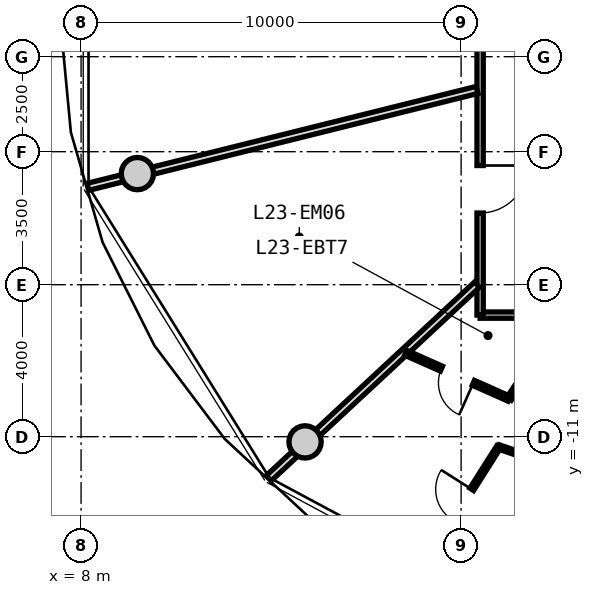
"""IFC4 building model, lengths in metres.
Left out: names, types, materials, properties, quantities, classifications, styles, units other than length and angle.
Written with IfcOpenShell. Run it as: python <this file> out.ifc"""

import sys

from ifc_helpers import new_model, si_unit, direction, frame, frame_2d, origin, origin_2d, place, context, subcontext, project, spatial, rectangle, circle, extrude, source, transform, mapped, element, fill, save


model = new_model("IFC4")
c1 = context("Model", 3, precision=1e-05, world=origin(), true_north=direction((0.0, 1.0)))
c2 = subcontext(c1, "Body", "Model", "MODEL_VIEW")
j1 = project(units=[si_unit("LENGTHUNIT", "METRE"), si_unit("PLANEANGLEUNIT", "RADIAN")], contexts=[c1])
p1 = place(None, origin())
s1 = spatial("IfcSite", under=j1, at=p1, CompositionType="ELEMENT")
p2 = place(p1, origin())
s2 = spatial("IfcBuilding", under=s1, at=p2, CompositionType="ELEMENT")
p3 = place(p2, frame((0.0, 0.0, 77.95)))
s3 = spatial("IfcBuildingStorey", under=s2, at=p3, CompositionType="ELEMENT", Elevation=77.95)
m1 = source(origin(), c2, "Body", "SweptSolid", [
    extrude(circle(Radius=0.425, at=origin_2d()), origin(), (0.0, 0.0, 1.0), 3.47),
])
for number, where, z_axis, x_axis in (
    (1, (9.481, -4.076, -0.42), (0.0, 0.0, 1.0), (1.0, 0.0, 0.0)),
    (2, (13.894, -11.137, -0.42), (0.0, 0.0, 1.0), (1.0, 0.0, 0.0)),
):
    element("IfcColumn", number, at=place(p3, frame(where, z_axis=z_axis, x_axis=x_axis)), inside=s3, PredefinedType="COLUMN", context=c2, shape_type="MappedRepresentation", body=[
        mapped(m1, transform((0.0, 0.0, 0.0), x_axis=(1.0, 0.0, 0.0), y_axis=(0.0, 1.0, 0.0), z_axis=(0.0, 0.0, 1.0), scale=1.0)),
    ])
m2 = source(origin(), c2, "Body", "SweptSolid", [
    extrude(rectangle(XDim=19.0, YDim=0.165, at=frame_2d((9.5, 0.0))), origin(), (0.0, 0.0, 1.0), 2.775),
])
p4 = place(p3, frame((37.5, -7.8, 0.0), z_axis=(0.0, 0.0, 1.0), x_axis=(-1.0, 0.0, 0.0)))
e3 = element("IfcWall", 3, at=p4, inside=s3, PredefinedType="PARTITIONING", context=c2, shape_type="MappedRepresentation", body=[
    mapped(m2, transform((0.0, 0.0, 0.0), x_axis=(1.0, 0.0, 0.0), y_axis=(0.0, 1.0, 0.0), z_axis=(0.0, 0.0, 1.0), scale=1.0)),
])
p5 = place(p4, frame((9.388, 0.0, 0.0)))
e4 = element("IfcOpeningElement", 4, at=p5, cuts=e3, PredefinedType="OPENING", context=c2, shape_type="SweptSolid", body=[
    extrude(rectangle(XDim=1.05, YDim=2.15, at=frame_2d((0.525, 1.075))), frame((0.0, 0.093, 0.0), z_axis=(0.0, -1.0, 0.0), x_axis=(1.0, 0.0, 0.0)), (0.0, 0.0, 1.0), 0.185),
])
m3 = source(origin(), c2, "Body", "SweptSolid", [
    extrude(rectangle(XDim=15.6, YDim=0.165, at=frame_2d((7.8, 0.0))), origin(), (0.0, 0.0, 1.0), 2.775),
])
p6 = place(p3, frame((18.5, -7.8, 0.0), z_axis=(0.0, 0.0, 1.0), x_axis=(0.0, 1.0, 0.0)))
e5 = element("IfcWall", 5, at=p6, inside=s3, PredefinedType="PARTITIONING", context=c2, shape_type="MappedRepresentation", body=[
    mapped(m3, transform((0.0, 0.0, 0.0), x_axis=(1.0, 0.0, 0.0), y_axis=(0.0, 1.0, 0.0), z_axis=(0.0, 0.0, 1.0), scale=1.0)),
])
p7 = place(p6, frame((13.304, 0.0, 0.0)))
e6 = element("IfcOpeningElement", 6, at=p7, cuts=e5, PredefinedType="OPENING", context=c2, shape_type="SweptSolid", body=[
    extrude(rectangle(XDim=0.92, YDim=2.1, at=frame_2d((0.46, 1.05))), frame((0.0, 0.093, 0.0), z_axis=(0.0, -1.0, 0.0), x_axis=(1.0, 0.0, 0.0)), (0.0, 0.0, 1.0), 0.185),
])
p8 = place(p6, frame((10.69, 0.0, 0.0)))
e7 = element("IfcOpeningElement", 7, at=p8, cuts=e5, PredefinedType="OPENING", context=c2, shape_type="SweptSolid", body=[
    extrude(rectangle(XDim=0.92, YDim=2.1, at=frame_2d((0.46, 1.05))), frame((0.0, 0.093, 0.0), z_axis=(0.0, -1.0, 0.0), x_axis=(1.0, 0.0, 0.0)), (0.0, 0.0, 1.0), 0.185),
])
p9 = place(p6, frame((7.175, 0.0, 0.0)))
e8 = element("IfcOpeningElement", 8, at=p9, cuts=e5, PredefinedType="OPENING", context=c2, shape_type="SweptSolid", body=[
    extrude(rectangle(XDim=1.25, YDim=2.2, at=frame_2d((0.625, 1.1))), frame((0.0, 0.093, 0.0), z_axis=(0.0, -1.0, 0.0), x_axis=(1.0, 0.0, 0.0)), (0.0, 0.0, 1.0), 0.185),
])
p10 = place(p6, frame((2.686, 0.0, 0.0)))
e9 = element("IfcOpeningElement", 9, at=p10, cuts=e5, PredefinedType="OPENING", context=c2, shape_type="SweptSolid", body=[
    extrude(rectangle(XDim=1.25, YDim=2.2, at=frame_2d((0.625, 1.1))), frame((0.0, 0.093, 0.0), z_axis=(0.0, -1.0, 0.0), x_axis=(1.0, 0.0, 0.0)), (0.0, 0.0, 1.0), 0.185),
])
m4 = source(origin(), c2, "Body", "SweptSolid", [
    extrude(rectangle(XDim=7.482, YDim=0.19, at=frame_2d((3.741, 0.0))), origin(), (0.0, 0.0, 1.0), 2.275),
])
p11 = place(p3, frame((18.42, -6.998, 0.0), z_axis=(0.0, 0.0, 1.0), x_axis=(-0.732508698043, -0.680757671489, 0.0)))
e10 = element("IfcWall", 10, at=p11, inside=s3, PredefinedType="PARTITIONING", context=c2, shape_type="MappedRepresentation", body=[
    mapped(m4, transform((0.0, 0.0, 0.0), x_axis=(1.0, 0.0, 0.0), y_axis=(0.0, 1.0, 0.0), z_axis=(0.0, 0.0, 1.0), scale=1.0)),
])
m5 = source(origin(), c2, "Body", "SweptSolid", [
    extrude(rectangle(XDim=2.61, YDim=0.14, at=frame_2d((1.305, 0.0))), origin(), (0.0, 0.0, 1.0), 2.775),
])
p12 = place(p3, frame((20.714, -7.83, 0.0), z_axis=(0.0, 0.0, 1.0), x_axis=(-0.55584360516, -0.83128688586, 0.0)))
e11 = element("IfcWall", 11, at=p12, inside=s3, PredefinedType="PARTITIONING", context=c2, shape_type="MappedRepresentation", body=[
    mapped(m5, transform((0.0, 0.0, 0.0), x_axis=(1.0, 0.0, 0.0), y_axis=(0.0, 1.0, 0.0), z_axis=(0.0, 0.0, 1.0), scale=1.0)),
])
m6 = source(origin(), c2, "Body", "SweptSolid", [
    extrude(rectangle(XDim=2.978, YDim=0.14, at=frame_2d((1.489, 0.0))), origin(), (0.0, 0.0, 1.0), 2.775),
])
p13 = place(p3, frame((19.263, -10.0, 0.0), z_axis=(0.0, 0.0, 1.0), x_axis=(-0.913970391966, 0.405780880043, 0.0)))
e12 = element("IfcWall", 12, at=p13, inside=s3, PredefinedType="PARTITIONING", context=c2, shape_type="MappedRepresentation", body=[
    mapped(m6, transform((0.0, 0.0, 0.0), x_axis=(1.0, 0.0, 0.0), y_axis=(0.0, 1.0, 0.0), z_axis=(0.0, 0.0, 1.0), scale=1.0)),
])
p14 = place(p13, frame((1.029, 0.0, 0.0)))
e13 = element("IfcOpeningElement", 13, at=p14, cuts=e12, PredefinedType="OPENING", context=c2, shape_type="SweptSolid", body=[
    extrude(rectangle(XDim=0.92, YDim=2.1, at=frame_2d((0.46, 1.05))), frame((0.0, 0.08, 0.0), z_axis=(0.0, -1.0, 0.0), x_axis=(1.0, 0.0, 0.0)), (0.0, 0.0, 1.0), 0.16),
])
m7 = source(origin(), c2, "Body", "SweptSolid", [
    extrude(rectangle(XDim=3.595, YDim=0.115, at=frame_2d((1.797, 0.0))), origin(), (0.0, 0.0, 1.0), 2.775),
])
p15 = place(p3, frame((18.988, -11.268, 0.0), z_axis=(0.0, 0.0, 1.0), x_axis=(-0.535384889205, -0.844608205271, 0.0)))
e14 = element("IfcWall", 14, at=p15, inside=s3, PredefinedType="PARTITIONING", context=c2, shape_type="MappedRepresentation", body=[
    mapped(m7, transform((0.0, 0.0, 0.0), x_axis=(1.0, 0.0, 0.0), y_axis=(0.0, 1.0, 0.0), z_axis=(0.0, 0.0, 1.0), scale=1.0)),
])
p16 = place(p15, frame((1.323, 0.0, 0.0)))
e15 = element("IfcOpeningElement", 15, at=p16, cuts=e14, PredefinedType="OPENING", context=c2, shape_type="SweptSolid", body=[
    extrude(rectangle(XDim=0.95, YDim=2.1, at=frame_2d((0.475, 1.05))), frame((0.0, 0.067, 0.0), z_axis=(0.0, -1.0, 0.0), x_axis=(1.0, 0.0, 0.0)), (0.0, 0.0, 1.0), 0.135),
])
m8 = source(origin(), c2, "Body", "SweptSolid", [
    extrude(rectangle(XDim=3.591, YDim=0.115, at=frame_2d((1.795, 0.0))), origin(), (0.0, 0.0, 1.0), 2.775),
])
p17 = place(p3, frame((18.988, -11.268, 0.0), z_axis=(0.0, 0.0, 1.0), x_axis=(0.946165628752, -0.323682874074, 0.0)))
e16 = element("IfcWall", 16, at=p17, inside=s3, PredefinedType="PARTITIONING", context=c2, shape_type="MappedRepresentation", body=[
    mapped(m8, transform((0.0, 0.0, 0.0), x_axis=(1.0, 0.0, 0.0), y_axis=(0.0, 1.0, 0.0), z_axis=(0.0, 0.0, 1.0), scale=1.0)),
])
m9 = source(origin(), c2, "Body", "SweptSolid", [
    extrude(rectangle(XDim=10.556, YDim=0.19, at=frame_2d((5.278, 0.0))), origin(), (0.0, 0.0, 1.0), 2.275),
])
p18 = place(p3, frame((18.42, -1.875, 0.0), z_axis=(0.0, 0.0, 1.0), x_axis=(-0.970363857851, -0.241648470667, 0.0)))
e17 = element("IfcWall", 17, at=p18, inside=s3, PredefinedType="PARTITIONING", context=c2, shape_type="MappedRepresentation", body=[
    mapped(m9, transform((0.0, 0.0, 0.0), x_axis=(1.0, 0.0, 0.0), y_axis=(0.0, 1.0, 0.0), z_axis=(0.0, 0.0, 1.0), scale=1.0)),
])
m10 = source(origin(), c2, "Body", "SweptSolid", [
    extrude(rectangle(XDim=0.92, YDim=2.1, at=frame_2d((0.46, 1.05))), frame((0.0, 0.025, 0.0), z_axis=(0.0, -1.0, 0.0), x_axis=(1.0, 0.0, 0.0)), (0.0, 0.0, 1.0), 0.05),
])
p19 = place(p14, origin())
e18 = element("IfcDoor", 18, at=p19, inside=s3, OperationType="SINGLE_SWING_LEFT", PredefinedType="DOOR", context=c2, shape_type="MappedRepresentation", body=[
    mapped(m10, transform((0.0, 0.0, 0.0), x_axis=(1.0, 0.0, 0.0), y_axis=(0.0, 1.0, 0.0), z_axis=(0.0, 0.0, 1.0), scale=1.0)),
])
fill(e13, e18)
m11 = source(origin(), c2, "Body", "SweptSolid", [
    extrude(rectangle(XDim=0.95, YDim=2.1, at=frame_2d((0.475, 1.05))), frame((0.0, 0.025, 0.0), z_axis=(0.0, -1.0, 0.0), x_axis=(1.0, 0.0, 0.0)), (0.0, 0.0, 1.0), 0.05),
])
p20 = place(p16, frame((0.95, 0.0, 0.0), z_axis=(0.0, 0.0, 1.0), x_axis=(-1.0, 0.0, 0.0)))
e19 = element("IfcDoor", 19, at=p20, inside=s3, OperationType="SINGLE_SWING_RIGHT", PredefinedType="DOOR", context=c2, shape_type="MappedRepresentation", body=[
    mapped(m11, transform((0.0, 0.0, 0.0), x_axis=(1.0, 0.0, 0.0), y_axis=(0.0, 1.0, 0.0), z_axis=(0.0, 0.0, 1.0), scale=1.0)),
])
fill(e15, e19)
m12 = source(origin(), c2, "Body", "SweptSolid", [
    extrude(rectangle(XDim=1.25, YDim=2.2, at=frame_2d((0.625, 1.1))), frame((0.0, 0.025, 0.0), z_axis=(0.0, -1.0, 0.0), x_axis=(1.0, 0.0, 0.0)), (0.0, 0.0, 1.0), 0.05),
])
p21 = place(p10, frame((1.25, 0.0, 0.0), z_axis=(0.0, 0.0, 1.0), x_axis=(-1.0, 0.0, 0.0)))
e20 = element("IfcDoor", 20, at=p21, inside=s3, OperationType="SINGLE_SWING_LEFT", PredefinedType="DOOR", context=c2, shape_type="MappedRepresentation", body=[
    mapped(m12, transform((0.0, 0.0, 0.0), x_axis=(1.0, 0.0, 0.0), y_axis=(0.0, 1.0, 0.0), z_axis=(0.0, 0.0, 1.0), scale=1.0)),
])
fill(e9, e20)
save(model, sys.argv[1])
